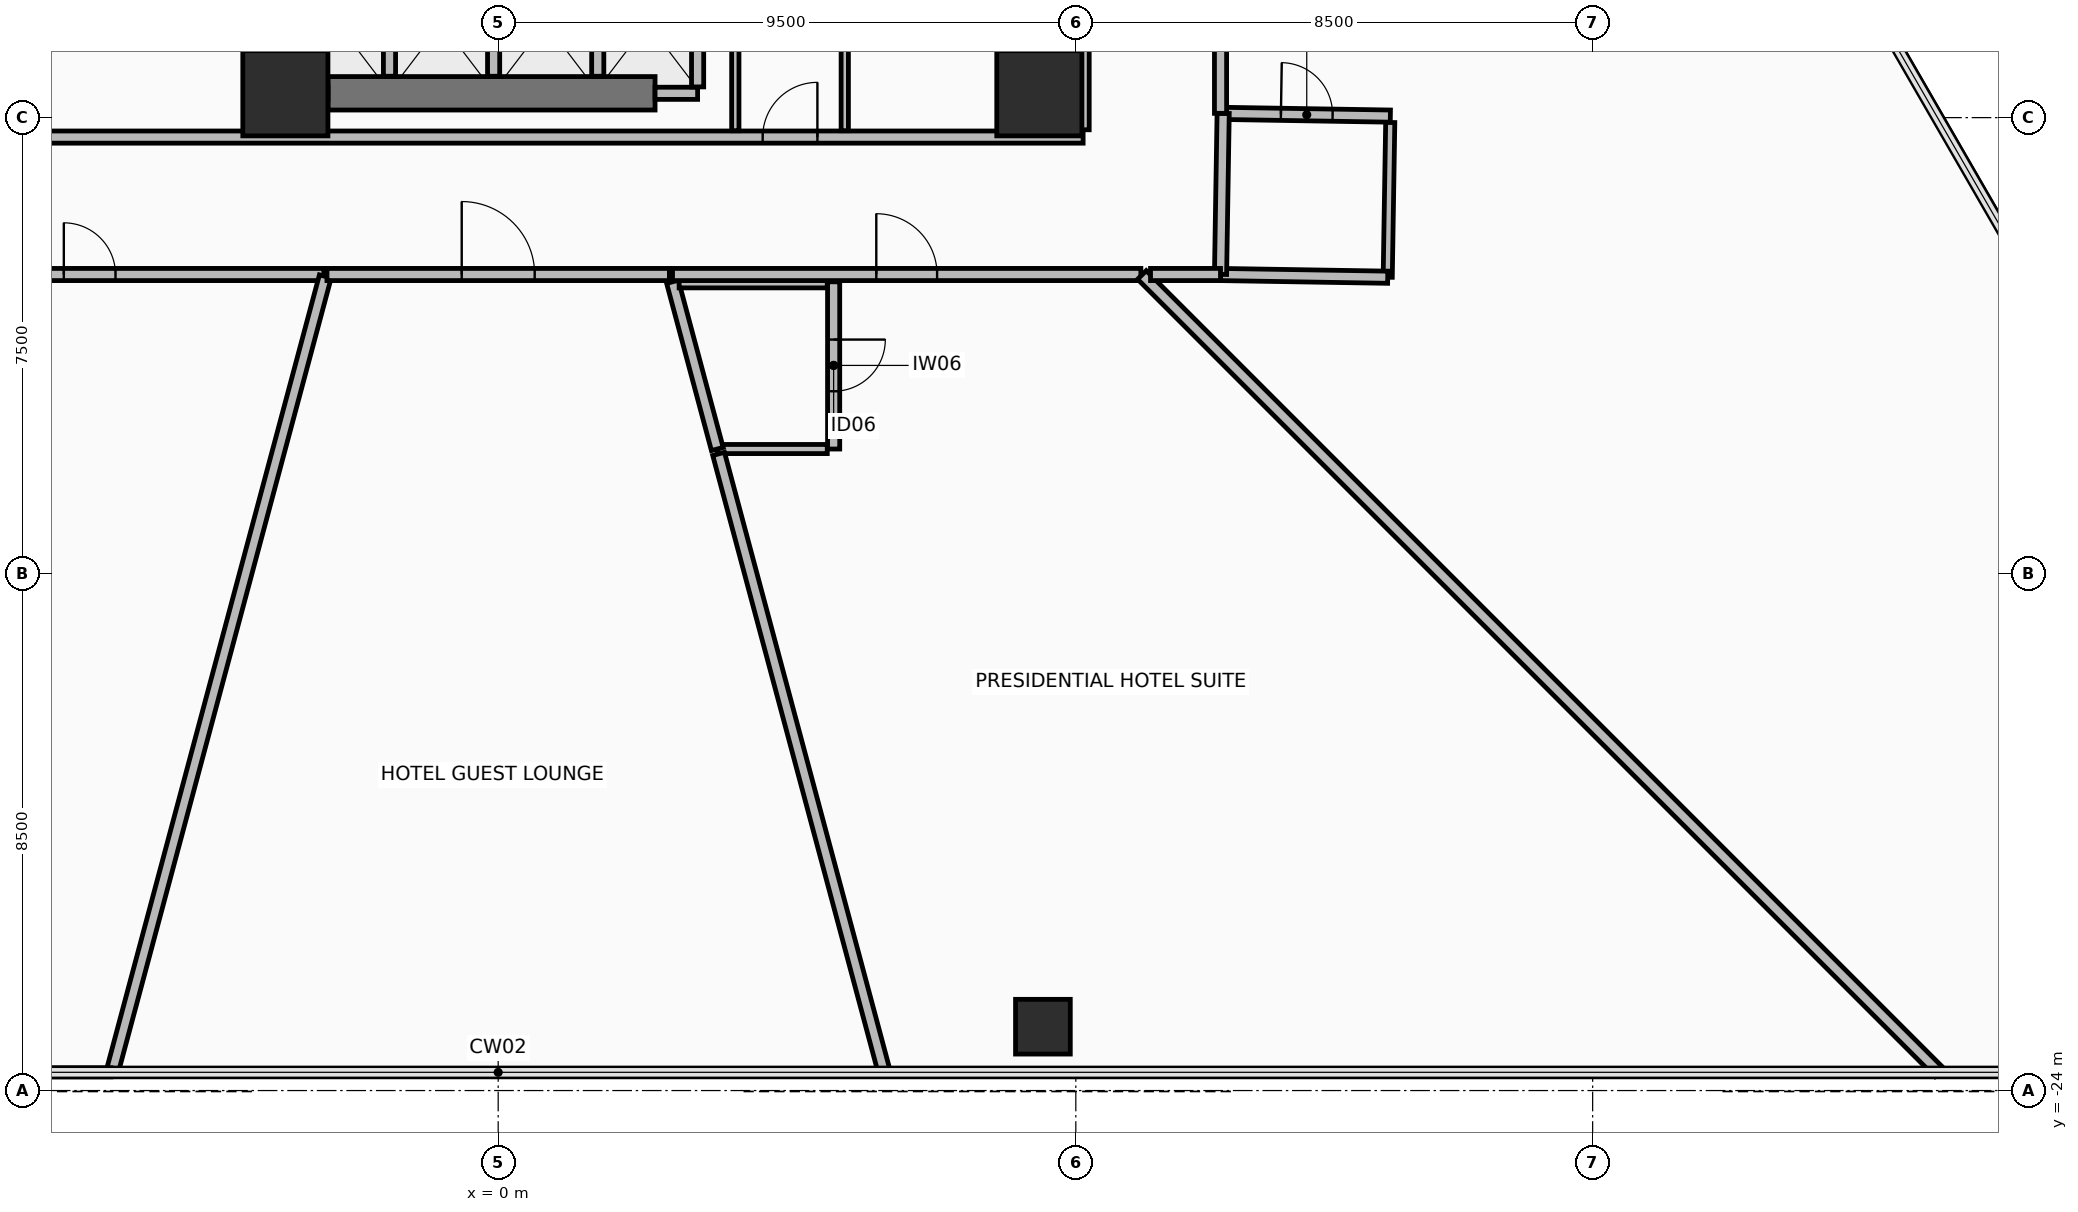
"""IFC4 building model, lengths in metres.
Left out: names, types, materials, properties, quantities, classifications, styles, units other than length and angle.
Written with IfcOpenShell. Run it as: python <this file> out.ifc"""

import sys

from ifc_helpers import new_model, si_unit, direction, frame, frame_2d, origin, origin_2d, place, context, subcontext, project, spatial, rectangle, hollow_rectangle, extrude, element, fill, save


model = new_model("IFC4")
c1 = context("Model", 3, precision=1e-05, world=origin(), true_north=direction((0.0, 1.0)))
c2 = subcontext(c1, "Body", "Model", "MODEL_VIEW")
j1 = project(units=[si_unit("LENGTHUNIT", "METRE"), si_unit("PLANEANGLEUNIT", "RADIAN")], contexts=[c1])
p1 = place(None, origin())
s1 = spatial("IfcSite", under=j1, at=p1, CompositionType="ELEMENT")
p2 = place(p1, origin())
s2 = spatial("IfcBuilding", under=s1, at=p2, CompositionType="ELEMENT")
p3 = place(p2, frame((0.0, 0.0, 52.25)))
s3 = spatial("IfcBuildingStorey", under=s2, at=p3, CompositionType="ELEMENT", Elevation=52.25)
for number, where, z_axis, x_axis in (
    (1, (-3.5, -7.6, 0.0), (0.0, 0.0, 1.0), (1.0, 0.0, 0.0)),
    (2, (8.9, -7.6, 0.0), (0.0, 0.0, 1.0), (1.0, 0.0, 0.0)),
):
    element("IfcColumn", number, at=place(p3, frame(where, z_axis=z_axis, x_axis=x_axis)), inside=s3, PredefinedType="COLUMN", context=c2, shape_type="SweptSolid", body=[
        extrude(rectangle(XDim=1.4, YDim=1.4, at=origin_2d()), origin(), (0.0, 0.0, 1.0), 4.75),
    ])
p4 = place(p3, frame((8.959, -22.95, 0.0), z_axis=(0.0, 0.0, 1.0), x_axis=(1.0, 0.0, 0.0)))
e3 = element("IfcColumn", 3, at=p4, inside=s3, PredefinedType="COLUMN", context=c2, shape_type="SweptSolid", body=[
    extrude(hollow_rectangle(XDim=0.9, YDim=0.9, WallThickness=0.05, at=origin_2d()), origin(), (0.0, 0.0, 1.0), 4.75),
])
p5 = place(p3, frame((-2.8, -7.6, 0.0), z_axis=(0.0, 0.0, 1.0), x_axis=(1.0, 0.0, 0.0)))
e4 = element("IfcWall", 4, at=p5, inside=s3, PredefinedType="SHEAR", context=c2, shape_type="SweptSolid", body=[
    extrude(rectangle(XDim=5.38, YDim=0.55, at=frame_2d((2.69, 0.0))), origin(), (0.0, 0.0, 1.0), 4.56),
])
p6 = place(p3, frame((-9.62, -8.32, 0.0), z_axis=(0.0, 0.0, 1.0), x_axis=(1.0, 0.0, 0.0)))
e5 = element("IfcWall", 5, at=p6, inside=s3, PredefinedType="PARTITIONING", context=c2, shape_type="SweptSolid", body=[
    extrude(rectangle(XDim=19.24, YDim=0.2, at=frame_2d((9.62, 0.0))), origin(), (0.0, 0.0, 1.0), 2.355),
])
p7 = place(p6, frame((13.97, 0.0, 0.0)))
e6 = element("IfcOpeningElement", 6, at=p7, cuts=e5, PredefinedType="OPENING", context=c2, shape_type="SweptSolid", body=[
    extrude(rectangle(XDim=0.9, YDim=2.1, at=frame_2d((0.45, 1.05))), frame((0.0, 0.11, 0.0), z_axis=(0.0, -1.0, 0.0), x_axis=(1.0, 0.0, 0.0)), (0.0, 0.0, 1.0), 0.22),
])
p8 = place(p3, frame((9.62, -8.2, 0.0), z_axis=(0.0, 0.0, 1.0), x_axis=(0.0, 1.0, 0.0)))
e7 = element("IfcWall", 7, at=p8, inside=s3, PredefinedType="PARTITIONING", context=c2, shape_type="SweptSolid", body=[
    extrude(rectangle(XDim=16.4, YDim=0.2, at=frame_2d((8.2, 0.0))), origin(), (0.0, 0.0, 1.0), 2.355),
])
p9 = place(p8, frame((12.65, 0.0, 0.0)))
e8 = element("IfcOpeningElement", 8, at=p9, cuts=e7, PredefinedType="OPENING", context=c2, shape_type="SweptSolid", body=[
    extrude(rectangle(XDim=1.1, YDim=2.15, at=frame_2d((0.55, 1.075))), frame((0.0, 0.11, 0.0), z_axis=(0.0, -1.0, 0.0), x_axis=(1.0, 0.0, 0.0)), (0.0, 0.0, 1.0), 0.22),
])
p10 = place(p3, frame((-3.5, -7.6, 0.0), z_axis=(0.0, 0.0, 1.0), x_axis=(1.0, 0.0, 0.0)))
e9 = element("IfcWall", 9, at=p10, inside=s3, PredefinedType="PARTITIONING", context=c2, shape_type="SweptSolid", body=[
    extrude(rectangle(XDim=0.7, YDim=0.2, at=frame_2d((0.35, 0.0))), origin(), (0.0, 0.0, 1.0), 3.755),
])
p11 = place(p3, frame((-3.5, -7.495, 0.0), z_axis=(0.0, 0.0, 1.0), x_axis=(0.0, 1.0, 0.0)))
e10 = element("IfcWall", 10, at=p11, inside=s3, PredefinedType="PARTITIONING", context=c2, shape_type="SweptSolid", body=[
    extrude(rectangle(XDim=2.065, YDim=0.2, at=frame_2d((1.033, 0.0))), origin(), (0.0, 0.0, 1.0), 3.755),
])
for number, where, z_axis, x_axis in (
    (11, (-1.788, -7.32, 0.0), (0.0, 0.0, 1.0), (0.0, 1.0, 0.0)),
    (12, (-0.075, -7.32, 0.0), (0.0, 0.0, 1.0), (0.0, 1.0, 0.0)),
    (13, (1.637, -7.32, 0.0), (0.0, 0.0, 1.0), (0.0, 1.0, 0.0)),
):
    element("IfcWall", number, at=place(p3, frame(where, z_axis=z_axis, x_axis=x_axis)), inside=s3, PredefinedType="PARTITIONING", context=c2, shape_type="SweptSolid", body=[
        extrude(rectangle(XDim=1.89, YDim=0.2, at=frame_2d((0.945, 0.0))), origin(), (0.0, 0.0, 1.0), 4.56),
    ])
p12 = place(p3, frame((2.58, -7.6, 0.0), z_axis=(0.0, 0.0, 1.0), x_axis=(1.0, 0.0, 0.0)))
e14 = element("IfcWall", 14, at=p12, inside=s3, PredefinedType="PARTITIONING", context=c2, shape_type="SweptSolid", body=[
    extrude(rectangle(XDim=0.7, YDim=0.2, at=frame_2d((0.35, 0.0))), origin(), (0.0, 0.0, 1.0), 3.755),
])
p13 = place(p3, frame((3.28, -7.495, 0.0), z_axis=(0.0, 0.0, 1.0), x_axis=(0.0, 1.0, 0.0)))
e15 = element("IfcWall", 15, at=p13, inside=s3, PredefinedType="PARTITIONING", context=c2, shape_type="SweptSolid", body=[
    extrude(rectangle(XDim=2.065, YDim=0.2, at=frame_2d((1.033, 0.0))), origin(), (0.0, 0.0, 1.0), 3.755),
])
p14 = place(p3, frame((5.7, -8.215, 0.0), z_axis=(0.0, 0.0, 1.0), x_axis=(0.0, 1.0, 0.0)))
e16 = element("IfcWall", 16, at=p14, inside=s3, PredefinedType="PARTITIONING", context=c2, shape_type="SweptSolid", body=[
    extrude(rectangle(XDim=2.615, YDim=0.12, at=frame_2d((1.308, 0.0))), origin(), (0.0, 0.0, 1.0), 3.755),
])
p15 = place(p3, frame((3.9, -5.665, 0.0), z_axis=(0.0, 0.0, 1.0), x_axis=(0.0, -1.0, 0.0)))
e17 = element("IfcWall", 17, at=p15, inside=s3, PredefinedType="PARTITIONING", context=c2, shape_type="SweptSolid", body=[
    extrude(rectangle(XDim=2.55, YDim=0.12, at=frame_2d((1.275, 0.0))), origin(), (0.0, 0.0, 1.0), 3.755),
])
p16 = place(p3, frame((5.517, -10.7, 0.0), z_axis=(0.0, 0.0, 1.0), x_axis=(0.0, -1.0, 0.0)))
e18 = element("IfcWall", 18, at=p16, inside=s3, PredefinedType="PARTITIONING", context=c2, shape_type="SweptSolid", body=[
    extrude(rectangle(XDim=2.75, YDim=0.2, at=frame_2d((1.375, 0.0))), origin(), (0.0, 0.0, 1.0), 4.56),
])
p17 = place(p16, frame((0.95, 0.0, 0.0)))
e19 = element("IfcOpeningElement", 19, at=p17, cuts=e18, PredefinedType="OPENING", context=c2, shape_type="SweptSolid", body=[
    extrude(rectangle(XDim=0.85, YDim=2.1, at=frame_2d((0.425, 1.05))), frame((0.0, 0.11, 0.0), z_axis=(0.0, -1.0, 0.0), x_axis=(1.0, 0.0, 0.0)), (0.0, 0.0, 1.0), 0.22),
])
p18 = place(p3, frame((5.412, -13.45, 0.0), z_axis=(0.0, 0.0, 1.0), x_axis=(-1.0, 0.0, 0.0)))
e20 = element("IfcWall", 20, at=p18, inside=s3, PredefinedType="PARTITIONING", context=c2, shape_type="SweptSolid", body=[
    extrude(rectangle(XDim=1.808, YDim=0.15, at=frame_2d((0.904, 0.0))), origin(), (0.0, 0.0, 1.0), 4.56),
])
p19 = place(p3, frame((3.604, -13.45, 0.0), z_axis=(0.0, 0.0, 1.0), x_axis=(-0.258804667121, 0.965929678743, 0.0)))
e21 = element("IfcWall", 21, at=p19, inside=s3, PredefinedType="PARTITIONING", context=c2, shape_type="SweptSolid", body=[
    extrude(rectangle(XDim=2.847, YDim=0.2, at=frame_2d((1.423, 0.0))), origin(), (0.0, 0.0, 1.0), 4.56),
])
p20 = place(p3, frame((2.976, -10.7, 0.0), z_axis=(0.0, 0.0, 1.0), x_axis=(1.0, 0.0, 0.0)))
e22 = element("IfcWall", 22, at=p20, inside=s3, PredefinedType="PARTITIONING", context=c2, shape_type="SweptSolid", body=[
    extrude(rectangle(XDim=2.436, YDim=0.2, at=frame_2d((1.218, 0.0))), origin(), (0.0, 0.0, 1.0), 4.56),
])
p21 = place(p3, frame((11.923, -7.93, 0.0), z_axis=(0.0, 0.0, 1.0), x_axis=(0.999868029143, -0.016245747077, 0.0)))
e23 = element("IfcWall", 23, at=p21, inside=s3, PredefinedType="PARTITIONING", context=c2, shape_type="SweptSolid", body=[
    extrude(rectangle(XDim=2.75, YDim=0.2, at=frame_2d((1.375, 0.0))), origin(), (0.0, 0.0, 1.0), 4.56),
])
p22 = place(p21, frame((0.95, 0.0, 0.0)))
e24 = element("IfcOpeningElement", 24, at=p22, cuts=e23, PredefinedType="OPENING", context=c2, shape_type="SweptSolid", body=[
    extrude(rectangle(XDim=0.85, YDim=2.1, at=frame_2d((0.425, 1.05))), frame((0.0, 0.11, 0.0), z_axis=(0.0, -1.0, 0.0), x_axis=(1.0, 0.0, 0.0)), (0.0, 0.0, 1.0), 0.22),
])
p23 = place(p3, frame((14.671, -8.08, 0.0), z_axis=(0.0, 0.0, 1.0), x_axis=(-0.016307914507, -0.99986701712, 0.0)))
e25 = element("IfcWall", 25, at=p23, inside=s3, PredefinedType="PARTITIONING", context=c2, shape_type="SweptSolid", body=[
    extrude(rectangle(XDim=2.545, YDim=0.15, at=frame_2d((1.272, 0.0))), origin(), (0.0, 0.0, 1.0), 2.355),
])
p24 = place(p3, frame((14.63, -10.625, 0.0), z_axis=(0.0, 0.0, 1.0), x_axis=(-0.999868029143, 0.016245747077, 0.0)))
e26 = element("IfcWall", 26, at=p24, inside=s3, PredefinedType="PARTITIONING", context=c2, shape_type="SweptSolid", body=[
    extrude(rectangle(XDim=2.75, YDim=0.2, at=frame_2d((1.375, 0.0))), origin(), (0.0, 0.0, 1.0), 2.355),
])
p25 = place(p3, frame((11.88, -10.578, 0.0), z_axis=(0.0, 0.0, 1.0), x_axis=(0.016318711927, 0.999866840955, 0.0)))
e27 = element("IfcWall", 27, at=p25, inside=s3, PredefinedType="PARTITIONING", context=c2, shape_type="SweptSolid", body=[
    extrude(rectangle(XDim=2.648, YDim=0.2, at=frame_2d((1.324, 0.0))), origin(), (0.0, 0.0, 1.0), 2.355),
])
p26 = place(p3, frame((-10.57, -10.58, 0.0), z_axis=(0.0, 0.0, 1.0), x_axis=(1.0, 0.0, 0.0)))
e28 = element("IfcWall", 28, at=p26, inside=s3, PredefinedType="PARTITIONING", context=c2, shape_type="SweptSolid", body=[
    extrude(rectangle(XDim=7.702, YDim=0.2, at=frame_2d((3.851, 0.0))), origin(), (0.0, 0.0, 1.0), 2.355),
])
p27 = place(p26, frame((3.426, 0.0, 0.0)))
e29 = element("IfcOpeningElement", 29, at=p27, cuts=e28, PredefinedType="OPENING", context=c2, shape_type="SweptSolid", body=[
    extrude(rectangle(XDim=0.85, YDim=2.1, at=frame_2d((0.425, 1.05))), frame((0.0, 0.11, 0.0), z_axis=(0.0, -1.0, 0.0), x_axis=(1.0, 0.0, 0.0)), (0.0, 0.0, 1.0), 0.22),
])
p28 = place(p3, frame((-2.843, -10.612, 0.0), z_axis=(0.0, 0.0, 1.0), x_axis=(-0.25882927933, -0.965923083978, 0.0)))
e30 = element("IfcWall", 30, at=p28, inside=s3, PredefinedType="PARTITIONING", context=c2, shape_type="SweptSolid", body=[
    extrude(rectangle(XDim=13.531, YDim=0.2, at=frame_2d((6.766, 0.0))), origin(), (0.0, 0.0, 1.0), 2.255),
])
p29 = place(p3, frame((-6.37, -23.7, 0.0), z_axis=(0.0, 0.0, 1.0), x_axis=(-1.0, 0.0, 0.0)))
e31 = element("IfcWall", 31, at=p29, inside=s3, PredefinedType="PARTITIONING", context=c2, shape_type="SweptSolid", body=[
    extrude(rectangle(XDim=17.182, YDim=0.15, at=frame_2d((8.591, 0.0))), origin(), (0.0, 0.0, 1.0), 2.355),
])
p30 = place(p3, frame((-2.816, -10.58, 0.0), z_axis=(0.0, 0.0, 1.0), x_axis=(1.0, 0.0, 0.0)))
e32 = element("IfcWall", 32, at=p30, inside=s3, PredefinedType="PARTITIONING", context=c2, shape_type="SweptSolid", body=[
    extrude(rectangle(XDim=5.631, YDim=0.2, at=frame_2d((2.816, 0.0))), origin(), (0.0, 0.0, 1.0), 4.56),
])
p31 = place(p30, frame((2.216, 0.0, 0.0)))
e33 = element("IfcOpeningElement", 33, at=p31, cuts=e32, PredefinedType="OPENING", context=c2, shape_type="SweptSolid", body=[
    extrude(rectangle(XDim=1.2, YDim=2.15, at=frame_2d((0.6, 1.075))), frame((0.0, 0.11, 0.0), z_axis=(0.0, -1.0, 0.0), x_axis=(1.0, 0.0, 0.0)), (0.0, 0.0, 1.0), 0.22),
])
p32 = place(p3, frame((3.625, -13.53, 0.0), z_axis=(0.0, 0.0, 1.0), x_axis=(0.258804083219, -0.96592983519, 0.0)))
e34 = element("IfcWall", 34, at=p32, inside=s3, PredefinedType="PARTITIONING", context=c2, shape_type="SweptSolid", body=[
    extrude(rectangle(XDim=10.529, YDim=0.2, at=frame_2d((5.264, 0.0))), origin(), (0.0, 0.0, 1.0), 2.255),
])
p33 = place(p3, frame((2.867, -10.58, 0.0), z_axis=(0.0, 0.0, 1.0), x_axis=(1.0, 0.0, 0.0)))
e35 = element("IfcWall", 35, at=p33, inside=s3, PredefinedType="PARTITIONING", context=c2, shape_type="SweptSolid", body=[
    extrude(rectangle(XDim=7.702, YDim=0.2, at=frame_2d((3.851, 0.0))), origin(), (0.0, 0.0, 1.0), 2.355),
])
p34 = place(p33, frame((3.351, 0.0, 0.0)))
e36 = element("IfcOpeningElement", 36, at=p34, cuts=e35, PredefinedType="OPENING", context=c2, shape_type="SweptSolid", body=[
    extrude(rectangle(XDim=1.0, YDim=2.15, at=frame_2d((0.5, 1.075))), frame((0.0, 0.11, 0.0), z_axis=(0.0, -1.0, 0.0), x_axis=(1.0, 0.0, 0.0)), (0.0, 0.0, 1.0), 0.22),
])
p35 = place(p3, frame((10.587, -10.587, 0.0), z_axis=(0.0, 0.0, 1.0), x_axis=(0.707106781187, -0.707106781187, 0.0)))
e37 = element("IfcWall", 37, at=p35, inside=s3, PredefinedType="PARTITIONING", context=c2, shape_type="SweptSolid", body=[
    extrude(rectangle(XDim=18.544, YDim=0.2, at=frame_2d((9.272, 0.0))), origin(), (0.0, 0.0, 1.0), 2.255),
])
p36 = place(p3, frame((10.729, -10.58, 0.0), z_axis=(0.0, 0.0, 1.0), x_axis=(1.0, 0.0, 0.0)))
e38 = element("IfcWall", 38, at=p36, inside=s3, PredefinedType="PARTITIONING", context=c2, shape_type="SweptSolid", body=[
    extrude(rectangle(XDim=1.151, YDim=0.2, at=frame_2d((0.575, 0.0))), origin(), (0.0, 0.0, 1.0), 4.56),
])
p37 = place(p3, frame((11.88, -7.93, 0.0), z_axis=(0.0, 0.0, 1.0), x_axis=(0.0, 1.0, 0.0)))
e39 = element("IfcWall", 39, at=p37, inside=s3, PredefinedType="PARTITIONING", context=c2, shape_type="SweptSolid", body=[
    extrude(rectangle(XDim=4.714, YDim=0.2, at=frame_2d((2.357, 0.0))), origin(), (0.0, 0.0, 1.0), 2.755),
])
p38 = place(p37, frame((1.857, 0.0, 0.0)))
e40 = element("IfcOpeningElement", 40, at=p38, cuts=e39, PredefinedType="OPENING", context=c2, shape_type="SweptSolid", body=[
    extrude(rectangle(XDim=1.0, YDim=2.15, at=frame_2d((0.5, 1.075))), frame((0.0, 0.11, 0.0), z_axis=(0.0, -1.0, 0.0), x_axis=(1.0, 0.0, 0.0)), (0.0, 0.0, 1.0), 0.22),
])
p39 = place(p7, frame((0.9, 0.0, 0.0), z_axis=(0.0, 0.0, 1.0), x_axis=(-1.0, 0.0, 0.0)))
e41 = element("IfcDoor", 41, at=p39, inside=s3, OperationType="SINGLE_SWING_LEFT", PredefinedType="DOOR", context=c2, shape_type="SweptSolid", body=[
    extrude(rectangle(XDim=0.9, YDim=2.1, at=frame_2d((0.45, 1.05))), frame((0.0, 0.025, 0.0), z_axis=(0.0, -1.0, 0.0), x_axis=(1.0, 0.0, 0.0)), (0.0, 0.0, 1.0), 0.05),
])
fill(e6, e41)
p40 = place(p17, origin())
e42 = element("IfcDoor", 42, at=p40, inside=s3, OperationType="SINGLE_SWING_RIGHT", PredefinedType="DOOR", context=c2, shape_type="SweptSolid", body=[
    extrude(rectangle(XDim=0.85, YDim=2.1, at=frame_2d((0.425, 1.05))), frame((0.0, 0.025, 0.0), z_axis=(0.0, -1.0, 0.0), x_axis=(1.0, 0.0, 0.0)), (0.0, 0.0, 1.0), 0.05),
])
fill(e19, e42)
p41 = place(p22, origin())
e43 = element("IfcDoor", 43, at=p41, inside=s3, OperationType="SINGLE_SWING_RIGHT", PredefinedType="DOOR", context=c2, shape_type="SweptSolid", body=[
    extrude(rectangle(XDim=0.85, YDim=2.1, at=frame_2d((0.425, 1.05))), frame((0.0, 0.025, 0.0), z_axis=(0.0, -1.0, 0.0), x_axis=(1.0, 0.0, 0.0)), (0.0, 0.0, 1.0), 0.05),
])
fill(e24, e43)
p42 = place(p27, origin())
e44 = element("IfcDoor", 44, at=p42, inside=s3, OperationType="SINGLE_SWING_RIGHT", PredefinedType="DOOR", context=c2, shape_type="SweptSolid", body=[
    extrude(rectangle(XDim=0.85, YDim=2.1, at=frame_2d((0.425, 1.05))), frame((0.0, 0.025, 0.0), z_axis=(0.0, -1.0, 0.0), x_axis=(1.0, 0.0, 0.0)), (0.0, 0.0, 1.0), 0.05),
])
fill(e29, e44)
p43 = place(p31, origin())
e45 = element("IfcDoor", 45, at=p43, inside=s3, OperationType="SINGLE_SWING_LEFT", PredefinedType="DOOR", context=c2, shape_type="SweptSolid", body=[
    extrude(rectangle(XDim=1.2, YDim=2.15, at=frame_2d((0.6, 1.075))), frame((0.0, 0.025, 0.0), z_axis=(0.0, -1.0, 0.0), x_axis=(1.0, 0.0, 0.0)), (0.0, 0.0, 1.0), 0.05),
])
fill(e33, e45)
p44 = place(p34, origin())
e46 = element("IfcDoor", 46, at=p44, inside=s3, OperationType="SINGLE_SWING_LEFT", PredefinedType="DOOR", context=c2, shape_type="SweptSolid", body=[
    extrude(rectangle(XDim=1.0, YDim=2.15, at=frame_2d((0.5, 1.075))), frame((0.0, 0.025, 0.0), z_axis=(0.0, -1.0, 0.0), x_axis=(1.0, 0.0, 0.0)), (0.0, 0.0, 1.0), 0.05),
])
fill(e36, e46)
save(model, sys.argv[1])
